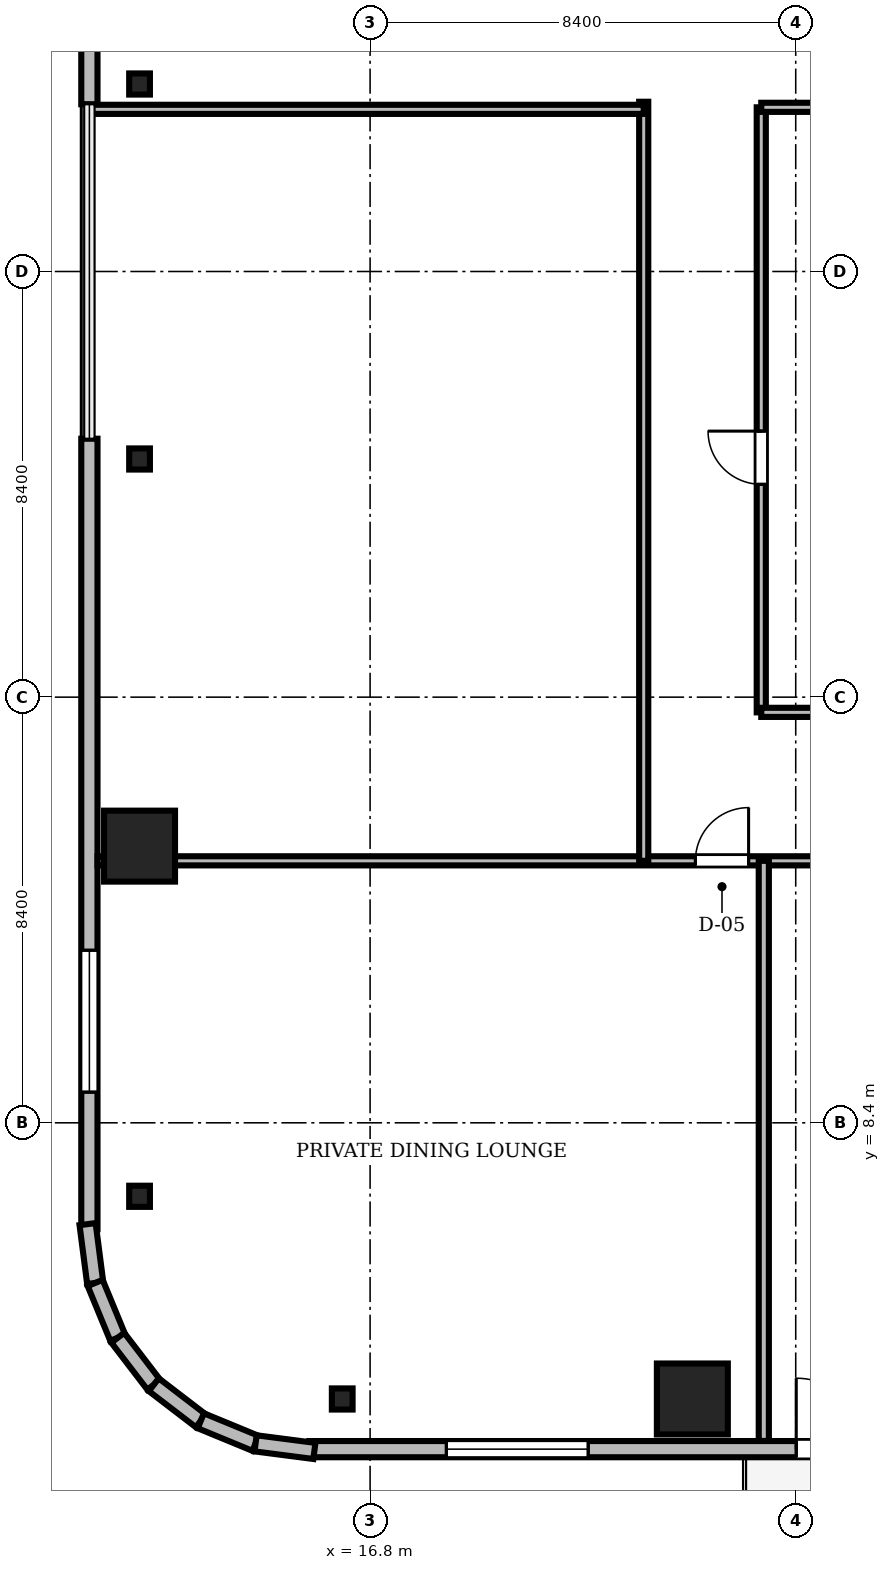
"""IFC4 building model, lengths in metres.
Left out: names, types, materials, properties, quantities, classifications, styles, units other than length and angle.
Written with IfcOpenShell. Run it as: python <this file> out.ifc"""

import sys

from ifc_helpers import new_model, si_unit, direction, frame, frame_2d, origin, origin_2d, place, context, subcontext, project, spatial, rectangle, i_section, extrude, source, transform, mapped, element, fill, save


model = new_model("IFC4")
c1 = context("Model", 3, precision=1e-05, world=origin(), true_north=direction((0.0, 1.0)))
c2 = subcontext(c1, "Body", "Model", "MODEL_VIEW")
j1 = project(units=[si_unit("LENGTHUNIT", "METRE"), si_unit("PLANEANGLEUNIT", "RADIAN")], contexts=[c1])
p1 = place(None, origin())
s1 = spatial("IfcSite", under=j1, at=p1, CompositionType="ELEMENT")
p2 = place(p1, origin())
s2 = spatial("IfcBuilding", under=s1, at=p2, CompositionType="ELEMENT")
p3 = place(p2, frame((0.0, 0.0, 188.55)))
s3 = spatial("IfcBuildingStorey", under=s2, at=p3, CompositionType="ELEMENT", Elevation=188.55)
m1 = source(origin(), c2, "Body", "SweptSolid", [
    extrude(rectangle(XDim=1.4, YDim=1.4, at=origin_2d()), origin(), (0.0, 0.0, 1.0), 3.53),
])
for number, where, z_axis, x_axis in (
    (1, (23.16, 2.95, 0.0), (0.0, 0.0, 1.0), (1.0, 0.0, 0.0)),
    (2, (12.25, 13.86, 0.0), (0.0, 0.0, 1.0), (1.0, 0.0, 0.0)),
):
    element("IfcColumn", number, at=place(p3, frame(where, z_axis=z_axis, x_axis=x_axis)), inside=s3, PredefinedType="COLUMN", context=c2, shape_type="MappedRepresentation", body=[
        mapped(m1, transform((0.0, 0.0, 0.0), scale=1.0)),
    ])
m2 = source(origin(), c2, "Body", "SweptSolid", [
    extrude(i_section(OverallWidth=0.409, OverallDepth=0.417, WebThickness=0.021, FlangeThickness=0.033, FilletRadius=0.015, at=origin_2d()), origin(), (0.0, 0.0, 1.0), 3.53),
])
for number, where, z_axis, x_axis in (
    (3, (16.25, 2.95, 0.0), (0.0, 0.0, 1.0), (1.0, 0.0, 0.0)),
    (4, (12.25, 28.9, 0.0), (0.0, 0.0, 1.0), (1.0, 0.0, 0.0)),
    (5, (12.25, 21.5, 0.0), (0.0, 0.0, 1.0), (1.0, 0.0, 0.0)),
    (6, (12.25, 6.95, 0.0), (0.0, 0.0, 1.0), (1.0, 0.0, 0.0)),
):
    element("IfcColumn", number, at=place(p3, frame(where, z_axis=z_axis, x_axis=x_axis)), inside=s3, PredefinedType="COLUMN", context=c2, shape_type="MappedRepresentation", body=[
        mapped(m2, transform((0.0, 0.0, 0.0), scale=1.0)),
    ])
m3 = source(origin(), c2, "Body", "SweptSolid", [
    extrude(rectangle(XDim=15.6, YDim=0.32, at=frame_2d((7.8, 0.0))), origin(), (0.0, 0.0, 1.0), 3.53),
])
p4 = place(p3, frame((15.6, 1.96, 0.0), z_axis=(0.0, 0.0, 1.0), x_axis=(1.0, 0.0, 0.0)))
e7 = element("IfcWall", 7, at=p4, inside=s3, PredefinedType="SOLIDWALL", context=c2, shape_type="MappedRepresentation", body=[
    mapped(m3, transform((0.0, 0.0, 0.0), scale=1.0)),
])
m4 = source(origin(), c2, "Body", "SweptSolid", [
    extrude(rectangle(XDim=1.4, YDim=2.3, at=frame_2d((0.7, 1.15))), frame((0.0, 0.17, 0.0), z_axis=(0.0, -1.0, 0.0), x_axis=(1.0, 0.0, 0.0)), (0.0, 0.0, 1.0), 0.34),
])
p5 = place(p4, frame((9.61, 0.0, 0.0)))
e8 = element("IfcOpeningElement", 8, at=p5, cuts=e7, PredefinedType="OPENING", context=c2, shape_type="MappedRepresentation", body=[
    mapped(m4, transform((0.0, 0.0, 0.0), scale=1.0)),
])
m5 = source(origin(), c2, "Body", "SweptSolid", [
    extrude(rectangle(XDim=2.8, YDim=2.4, at=frame_2d((1.4, 1.2))), frame((0.0, 0.17, 0.0), z_axis=(0.0, -1.0, 0.0), x_axis=(1.0, 0.0, 0.0)), (0.0, 0.0, 1.0), 0.34),
])
p6 = place(p4, frame((2.705, 0.0, 0.72)))
e9 = element("IfcOpeningElement", 9, at=p6, cuts=e7, PredefinedType="OPENING", context=c2, shape_type="MappedRepresentation", body=[
    mapped(m5, transform((0.0, 0.0, 0.0), scale=1.0)),
])
m6 = source(origin(), c2, "Body", "SweptSolid", [
    extrude(rectangle(XDim=15.6, YDim=0.32, at=frame_2d((7.8, 0.0))), origin(), (0.0, 0.0, 1.0), 3.53),
])
p7 = place(p3, frame((11.26, 44.1, 0.0), z_axis=(0.0, 0.0, 1.0), x_axis=(0.0, -1.0, 0.0)))
e10 = element("IfcWall", 10, at=p7, inside=s3, PredefinedType="SOLIDWALL", context=c2, shape_type="MappedRepresentation", body=[
    mapped(m6, transform((0.0, 0.0, 0.0), scale=1.0)),
])
p8 = place(p7, frame((9.61, 0.0, 0.0)))
e11 = element("IfcOpeningElement", 11, at=p8, cuts=e10, PredefinedType="OPENING", context=c2, shape_type="MappedRepresentation", body=[
    mapped(m4, transform((0.0, 0.0, 0.0), scale=1.0)),
])
p9 = place(p7, frame((2.705, 0.0, 0.72)))
e12 = element("IfcOpeningElement", 12, at=p9, cuts=e10, PredefinedType="OPENING", context=c2, shape_type="MappedRepresentation", body=[
    mapped(m5, transform((0.0, 0.0, 0.0), scale=1.0)),
])
p10 = place(p3, frame((11.26, 21.9, 0.0), z_axis=(0.0, 0.0, 1.0), x_axis=(0.0, -1.0, 0.0)))
e13 = element("IfcWall", 13, at=p10, inside=s3, PredefinedType="SOLIDWALL", context=c2, shape_type="MappedRepresentation", body=[
    mapped(m3, transform((0.0, 0.0, 0.0), scale=1.0)),
])
p11 = place(p10, frame((10.095, 0.0, 0.72)))
e14 = element("IfcOpeningElement", 14, at=p11, cuts=e13, PredefinedType="OPENING", context=c2, shape_type="MappedRepresentation", body=[
    mapped(m5, transform((0.0, 0.0, 0.0), scale=1.0)),
])
m7 = source(origin(), c2, "Body", "SweptSolid", [
    extrude(rectangle(XDim=1.171, YDim=0.32, at=frame_2d((0.585, 0.0))), origin(), (0.0, 0.0, 1.0), 3.53),
])
p12 = place(p3, frame((11.224, 6.401, 0.0), z_axis=(0.0, 0.0, 1.0), x_axis=(0.128269133229, -0.991739395941, 0.0)))
e15 = element("IfcWall", 15, at=p12, inside=s3, PredefinedType="SOLIDWALL", context=c2, shape_type="MappedRepresentation", body=[
    mapped(m7, transform((0.0, 0.0, 0.0), scale=1.0)),
])
m8 = source(origin(), c2, "Body", "SweptSolid", [
    extrude(rectangle(XDim=1.169, YDim=0.32, at=frame_2d((0.584, 0.0))), origin(), (0.0, 0.0, 1.0), 3.53),
])
for number, where, z_axis, x_axis in (
    (16, (11.375, 5.24, 0.0), (0.0, 0.0, 1.0), (0.381, -0.925, 0.0)),
    (17, (11.82, 4.159, 0.0), (0.0, 0.0, 1.0), (0.608, -0.794, 0.0)),
):
    element("IfcWall", number, at=place(p3, frame(where, z_axis=z_axis, x_axis=x_axis)), inside=s3, PredefinedType="SOLIDWALL", context=c2, shape_type="MappedRepresentation", body=[
        mapped(m8, transform((0.0, 0.0, 0.0), scale=1.0)),
    ])
m9 = source(origin(), c2, "Body", "SweptSolid", [
    extrude(rectangle(XDim=1.169, YDim=0.32, at=frame_2d((0.584, 0.0))), origin(), (0.0, 0.0, 1.0), 3.53),
])
p13 = place(p3, frame((12.531, 3.231, 0.0), z_axis=(0.0, 0.0, 1.0), x_axis=(0.793663520347, -0.608356981114, 0.0)))
e18 = element("IfcWall", 18, at=p13, inside=s3, PredefinedType="SOLIDWALL", context=c2, shape_type="MappedRepresentation", body=[
    mapped(m9, transform((0.0, 0.0, 0.0), scale=1.0)),
])
m10 = source(origin(), c2, "Body", "SweptSolid", [
    extrude(rectangle(XDim=1.169, YDim=0.32, at=frame_2d((0.585, 0.0))), origin(), (0.0, 0.0, 1.0), 3.53),
])
p14 = place(p3, frame((13.459, 2.52, 0.0), z_axis=(0.0, 0.0, 1.0), x_axis=(0.924479075121, -0.381232789334, 0.0)))
e19 = element("IfcWall", 19, at=p14, inside=s3, PredefinedType="SOLIDWALL", context=c2, shape_type="MappedRepresentation", body=[
    mapped(m10, transform((0.0, 0.0, 0.0), scale=1.0)),
])
m11 = source(origin(), c2, "Body", "SweptSolid", [
    extrude(rectangle(XDim=1.17, YDim=0.32, at=frame_2d((0.585, 0.0))), origin(), (0.0, 0.0, 1.0), 3.53),
])
p15 = place(p3, frame((14.54, 2.074, 0.0), z_axis=(0.0, 0.0, 1.0), x_axis=(0.991762485493, -0.128090485085, 0.0)))
e20 = element("IfcWall", 20, at=p15, inside=s3, PredefinedType="SOLIDWALL", context=c2, shape_type="MappedRepresentation", body=[
    mapped(m11, transform((0.0, 0.0, 0.0), scale=1.0)),
])
m12 = source(origin(), c2, "Body", "SweptSolid", [
    extrude(rectangle(XDim=46.156, YDim=0.18, at=frame_2d((23.078, 0.0))), origin(), (0.0, 0.0, 1.0), 2.772),
])
p16 = place(p3, frame((11.422, 13.57, 0.0), z_axis=(0.0, 0.0, 1.0), x_axis=(1.0, 0.0, 0.0)))
e21 = element("IfcWall", 21, at=p16, inside=s3, PredefinedType="PARTITIONING", context=c2, shape_type="MappedRepresentation", body=[
    mapped(m12, transform((0.0, 0.0, 0.0), scale=1.0)),
])
m13 = source(origin(), c2, "Body", "SweptSolid", [
    extrude(rectangle(XDim=1.05, YDim=2.2, at=frame_2d((0.525, 1.1))), frame((0.0, 0.1, 0.0), z_axis=(0.0, -1.0, 0.0), x_axis=(1.0, 0.0, 0.0)), (0.0, 0.0, 1.0), 0.2),
])
p17 = place(p16, frame((11.798, 0.0, 0.0)))
e22 = element("IfcOpeningElement", 22, at=p17, cuts=e21, PredefinedType="OPENING", context=c2, shape_type="MappedRepresentation", body=[
    mapped(m13, transform((0.0, 0.0, 0.0), scale=1.0)),
])
p18 = place(p16, frame((16.503, 0.0, 0.0)))
e23 = element("IfcOpeningElement", 23, at=p18, cuts=e21, PredefinedType="OPENING", context=c2, shape_type="MappedRepresentation", body=[
    mapped(m13, transform((0.0, 0.0, 0.0), scale=1.0)),
])
p19 = place(p16, frame((24.253, 0.0, 0.0)))
e24 = element("IfcOpeningElement", 24, at=p19, cuts=e21, PredefinedType="OPENING", context=c2, shape_type="MappedRepresentation", body=[
    mapped(m13, transform((0.0, 0.0, 0.0), scale=1.0)),
])
p20 = place(p16, frame((32.003, 0.0, 0.0)))
e25 = element("IfcOpeningElement", 25, at=p20, cuts=e21, PredefinedType="OPENING", context=c2, shape_type="MappedRepresentation", body=[
    mapped(m13, transform((0.0, 0.0, 0.0), scale=1.0)),
])
p21 = place(p16, frame((37.498, 0.0, 0.0)))
e26 = element("IfcOpeningElement", 26, at=p21, cuts=e21, PredefinedType="OPENING", context=c2, shape_type="MappedRepresentation", body=[
    mapped(m13, transform((0.0, 0.0, 0.0), scale=1.0)),
])
m14 = source(origin(), c2, "Body", "SweptSolid", [
    extrude(rectangle(XDim=11.94, YDim=0.18, at=frame_2d((5.97, 0.0))), origin(), (0.0, 0.0, 1.0), 2.972),
])
p22 = place(p3, frame((24.52, 16.5, 0.0), z_axis=(0.0, 0.0, 1.0), x_axis=(0.0, 1.0, 0.0)))
e27 = element("IfcWall", 27, at=p22, inside=s3, PredefinedType="PARTITIONING", context=c2, shape_type="MappedRepresentation", body=[
    mapped(m14, transform((0.0, 0.0, 0.0), scale=1.0)),
])
p23 = place(p22, frame((4.5, 0.0, 0.0)))
e28 = element("IfcOpeningElement", 28, at=p23, cuts=e27, PredefinedType="OPENING", context=c2, shape_type="MappedRepresentation", body=[
    mapped(m13, transform((0.0, 0.0, 0.0), scale=1.0)),
])
m15 = source(origin(), c2, "Body", "SweptSolid", [
    extrude(rectangle(XDim=14.98, YDim=0.18, at=frame_2d((7.49, 0.0))), origin(), (0.0, 0.0, 1.0), 2.972),
])
p24 = place(p3, frame((22.2, 13.57, 0.0), z_axis=(0.0, 0.0, 1.0), x_axis=(0.0, 1.0, 0.0)))
e29 = element("IfcWall", 29, at=p24, inside=s3, PredefinedType="PARTITIONING", context=c2, shape_type="MappedRepresentation", body=[
    mapped(m15, transform((0.0, 0.0, 0.0), scale=1.0)),
])
m16 = source(origin(), c2, "Body", "SweptSolid", [
    extrude(rectangle(XDim=11.448, YDim=0.2, at=frame_2d((5.724, 0.0))), origin(), (0.0, 0.0, 1.0), 2.772),
])
p25 = place(p3, frame((24.57, 2.122, 0.0), z_axis=(0.0, 0.0, 1.0), x_axis=(0.0, 1.0, 0.0)))
e30 = element("IfcWall", 30, at=p25, inside=s3, PredefinedType="PARTITIONING", context=c2, shape_type="MappedRepresentation", body=[
    mapped(m16, transform((0.0, 0.0, 0.0), scale=1.0)),
])
m17 = source(origin(), c2, "Body", "SweptSolid", [
    extrude(rectangle(XDim=10.97, YDim=0.18, at=frame_2d((5.485, 0.0))), origin(), (0.0, 0.0, 1.0), 2.772),
])
p26 = place(p3, frame((11.23, 28.4, 0.0), z_axis=(0.0, 0.0, 1.0), x_axis=(1.0, 0.0, 0.0)))
e31 = element("IfcWall", 31, at=p26, inside=s3, PredefinedType="PARTITIONING", context=c2, shape_type="MappedRepresentation", body=[
    mapped(m17, transform((0.0, 0.0, 0.0), scale=1.0)),
])
m18 = source(origin(), c2, "Body", "SweptSolid", [
    extrude(rectangle(XDim=3.88, YDim=0.18, at=frame_2d((1.94, 0.0))), origin(), (0.0, 0.0, 1.0), 3.53),
])
for number, where, z_axis, x_axis in (
    (32, (24.52, 16.5, 0.0), (0.0, 0.0, 1.0), (1.0, 0.0, 0.0)),
    (33, (24.52, 28.44, 0.0), (0.0, 0.0, 1.0), (1.0, 0.0, 0.0)),
):
    element("IfcWall", number, at=place(p3, frame(where, z_axis=z_axis, x_axis=x_axis)), inside=s3, PredefinedType="PARTITIONING", context=c2, shape_type="MappedRepresentation", body=[
        mapped(m18, transform((0.0, 0.0, 0.0), scale=1.0)),
    ])
m19 = source(origin(), c2, "Body", "SweptSolid", [
    extrude(rectangle(XDim=1.4, YDim=2.3, at=frame_2d((0.7, 1.15))), frame((0.0, 0.025, 0.0), z_axis=(0.0, -1.0, 0.0), x_axis=(1.0, 0.0, 0.0)), (0.0, 0.0, 1.0), 0.05),
])
p27 = place(p5, frame((1.4, 0.0, 0.0), z_axis=(0.0, 0.0, 1.0), x_axis=(-1.0, 0.0, 0.0)))
e34 = element("IfcDoor", 34, at=p27, inside=s3, OperationType="DOUBLE_DOOR_SLIDING", PredefinedType="DOOR", context=c2, shape_type="MappedRepresentation", body=[
    mapped(m19, transform((0.0, 0.0, 0.0), scale=1.0)),
])
fill(e8, e34)
m20 = source(origin(), c2, "Body", "SweptSolid", [
    extrude(rectangle(XDim=2.8, YDim=2.4, at=frame_2d((1.4, 1.2))), frame((0.0, 0.03, 0.0), z_axis=(0.0, -1.0, 0.0), x_axis=(1.0, 0.0, 0.0)), (0.0, 0.0, 1.0), 0.06),
])
p28 = place(p6, origin())
e35 = element("IfcWindow", 35, at=p28, inside=s3, PartitioningType="SINGLE_PANEL", PredefinedType="WINDOW", context=c2, shape_type="MappedRepresentation", body=[
    mapped(m20, transform((0.0, 0.0, 0.0), scale=1.0)),
])
fill(e9, e35)
p29 = place(p11, origin())
e36 = element("IfcWindow", 36, at=p29, inside=s3, PartitioningType="SINGLE_PANEL", PredefinedType="WINDOW", context=c2, shape_type="MappedRepresentation", body=[
    mapped(m20, transform((0.0, 0.0, 0.0), scale=1.0)),
])
fill(e14, e36)
m21 = source(origin(), c2, "Body", "SweptSolid", [
    extrude(rectangle(XDim=1.05, YDim=2.2, at=frame_2d((0.525, 1.1))), frame((0.0, 0.025, 0.0), z_axis=(0.0, -1.0, 0.0), x_axis=(1.0, 0.0, 0.0)), (0.0, 0.0, 1.0), 0.05),
])
p30 = place(p17, origin())
e37 = element("IfcDoor", 37, at=p30, inside=s3, OperationType="SINGLE_SWING_RIGHT", PredefinedType="DOOR", context=c2, shape_type="MappedRepresentation", body=[
    mapped(m21, transform((0.0, 0.0, 0.0), scale=1.0)),
])
fill(e22, e37)
p31 = place(p23, origin())
e38 = element("IfcDoor", 38, at=p31, inside=s3, OperationType="SINGLE_SWING_RIGHT", PredefinedType="DOOR", context=c2, shape_type="MappedRepresentation", body=[
    mapped(m21, transform((0.0, 0.0, 0.0), scale=1.0)),
])
fill(e28, e38)
save(model, sys.argv[1])
